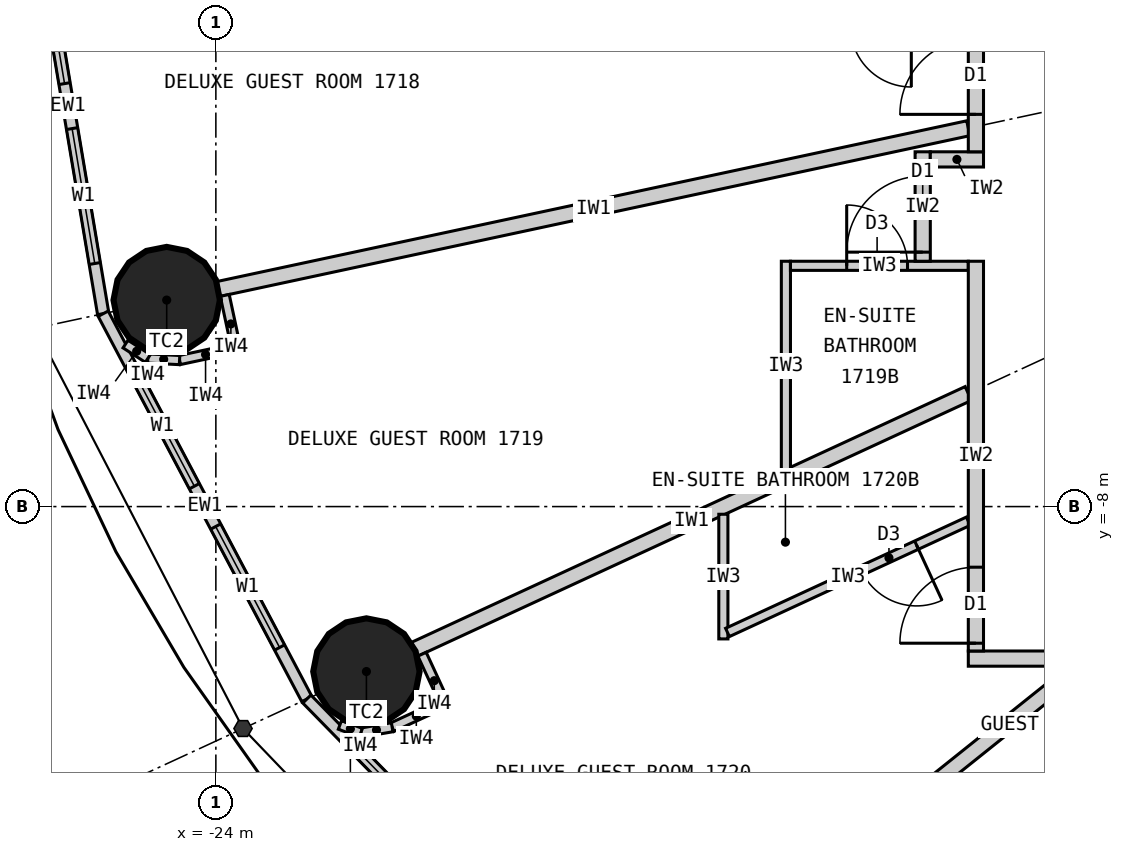
"""IFC4 building model, lengths in metres.
Left out: names, types, materials, properties, quantities, classifications, styles, units other than length and angle.
Written with IfcOpenShell. Run it as: python <this file> out.ifc"""

import sys

from ifc_helpers import new_model, si_unit, direction, frame, frame_2d, origin, origin_2d, place, context, subcontext, project, spatial, rectangle, circle, extrude, element, fill, save


model = new_model("IFC4")
c1 = context("Model", 3, precision=1e-05, world=origin(), true_north=direction((0.0, 1.0)))
c2 = subcontext(c1, "Body", "Model", "MODEL_VIEW")
j1 = project(units=[si_unit("LENGTHUNIT", "METRE"), si_unit("PLANEANGLEUNIT", "RADIAN")], contexts=[c1])
p1 = place(None, origin())
s1 = spatial("IfcSite", under=j1, at=p1, CompositionType="ELEMENT")
p2 = place(p1, origin())
s2 = spatial("IfcBuilding", under=s1, at=p2, CompositionType="ELEMENT")
p3 = place(p2, frame((0.0, 0.0, 70.5)))
s3 = spatial("IfcBuildingStorey", under=s2, at=p3, CompositionType="ELEMENT", Elevation=70.5)
for number, where, z_axis, x_axis in (
    (1, (-24.647, -5.283, 0.0), (0.0, 0.0, 1.0), (1.0, 0.0, 0.0)),
    (2, (-22.019, -10.17, 0.0), (0.0, 0.0, 1.0), (1.0, 0.0, 0.0)),
):
    element("IfcColumn", number, at=place(p3, frame(where, z_axis=z_axis, x_axis=x_axis)), inside=s3, PredefinedType="COLUMN", context=c2, shape_type="SweptSolid", body=[
        extrude(circle(Radius=0.7, at=origin_2d()), origin(), (0.0, 0.0, 1.0), 3.3),
    ])
p4 = place(p3, frame((-26.4, 0.0, 0.0), z_axis=(0.0, 0.0, 1.0), x_axis=(0.165642551694, -0.986185857264, 0.0)))
e3 = element("IfcWall", 3, at=p4, inside=s3, PredefinedType="ELEMENTEDWALL", context=c2, shape_type="SweptSolid", body=[
    extrude(rectangle(XDim=5.539, YDim=0.15, at=frame_2d((2.77, 0.0))), origin(), (0.0, 0.0, 1.0), 3.12),
])
p5 = place(p4, frame((0.669, 0.0, 0.9)))
e4 = element("IfcOpeningElement", 4, at=p5, cuts=e3, PredefinedType="OPENING", context=c2, shape_type="SweptSolid", body=[
    extrude(rectangle(XDim=1.8, YDim=1.9, at=frame_2d((0.9, 0.95))), frame((0.0, 0.085, 0.0), z_axis=(0.0, -1.0, 0.0), x_axis=(1.0, 0.0, 0.0)), (0.0, 0.0, 1.0), 0.17),
])
p6 = place(p4, frame((3.07, 0.0, 0.9)))
e5 = element("IfcOpeningElement", 5, at=p6, cuts=e3, PredefinedType="OPENING", context=c2, shape_type="SweptSolid", body=[
    extrude(rectangle(XDim=1.8, YDim=1.9, at=frame_2d((0.9, 0.95))), frame((0.0, 0.085, 0.0), z_axis=(0.0, -1.0, 0.0), x_axis=(1.0, 0.0, 0.0)), (0.0, 0.0, 1.0), 0.17),
])
p7 = place(p3, frame((-25.482, -5.462, 0.0), z_axis=(0.0, 0.0, 1.0), x_axis=(0.467296867008, -0.884100468321, 0.0)))
e6 = element("IfcWall", 6, at=p7, inside=s3, PredefinedType="ELEMENTEDWALL", context=c2, shape_type="SweptSolid", body=[
    extrude(rectangle(XDim=5.734, YDim=0.15, at=frame_2d((2.867, 0.0))), origin(), (0.0, 0.0, 1.0), 3.12),
])
p8 = place(p7, frame((0.767, 0.0, 0.9)))
e7 = element("IfcOpeningElement", 7, at=p8, cuts=e6, PredefinedType="OPENING", context=c2, shape_type="SweptSolid", body=[
    extrude(rectangle(XDim=1.8, YDim=1.9, at=frame_2d((0.9, 0.95))), frame((0.0, 0.085, 0.0), z_axis=(0.0, -1.0, 0.0), x_axis=(1.0, 0.0, 0.0)), (0.0, 0.0, 1.0), 0.17),
])
p9 = place(p7, frame((3.167, 0.0, 0.9)))
e8 = element("IfcOpeningElement", 8, at=p9, cuts=e6, PredefinedType="OPENING", context=c2, shape_type="SweptSolid", body=[
    extrude(rectangle(XDim=1.8, YDim=1.9, at=frame_2d((0.9, 0.95))), frame((0.0, 0.085, 0.0), z_axis=(0.0, -1.0, 0.0), x_axis=(1.0, 0.0, 0.0)), (0.0, 0.0, 1.0), 0.17),
])
p10 = place(p3, frame((-22.803, -10.532, 0.0), z_axis=(0.0, 0.0, 1.0), x_axis=(0.699602905915, -0.714531856557, 0.0)))
e9 = element("IfcWall", 9, at=p10, inside=s3, PredefinedType="ELEMENTEDWALL", context=c2, shape_type="SweptSolid", body=[
    extrude(rectangle(XDim=6.051, YDim=0.15, at=frame_2d((3.025, 0.0))), origin(), (0.0, 0.0, 1.0), 3.12),
])
p11 = place(p10, frame((0.926, 0.0, 0.9)))
e10 = element("IfcOpeningElement", 10, at=p11, cuts=e9, PredefinedType="OPENING", context=c2, shape_type="SweptSolid", body=[
    extrude(rectangle(XDim=1.8, YDim=1.9, at=frame_2d((0.9, 0.95))), frame((0.0, 0.085, 0.0), z_axis=(0.0, -1.0, 0.0), x_axis=(1.0, 0.0, 0.0)), (0.0, 0.0, 1.0), 0.17),
])
p12 = place(p10, frame((3.325, 0.0, 0.9)))
e11 = element("IfcOpeningElement", 11, at=p12, cuts=e9, PredefinedType="OPENING", context=c2, shape_type="SweptSolid", body=[
    extrude(rectangle(XDim=1.8, YDim=1.9, at=frame_2d((0.9, 0.95))), frame((0.0, 0.085, 0.0), z_axis=(0.0, -1.0, 0.0), x_axis=(1.0, 0.0, 0.0)), (0.0, 0.0, 1.0), 0.17),
])
p13 = place(p3, frame((14.1, -10.0, 0.0), z_axis=(0.0, 0.0, 1.0), x_axis=(-1.0, 0.0, 0.0)))
e12 = element("IfcWall", 12, at=p13, inside=s3, PredefinedType="PARTITIONING", context=c2, shape_type="SweptSolid", body=[
    extrude(rectangle(XDim=28.2, YDim=0.2, at=frame_2d((14.1, 0.0))), origin(), (0.0, 0.0, 1.0), 3.12),
])
p14 = place(p13, frame((24.165, 0.0, 0.0)))
e13 = element("IfcOpeningElement", 13, at=p14, cuts=e12, PredefinedType="OPENING", context=c2, shape_type="SweptSolid", body=[
    extrude(rectangle(XDim=1.0, YDim=2.2, at=frame_2d((0.5, 1.1))), frame((0.0, 0.11, 0.0), z_axis=(0.0, -1.0, 0.0), x_axis=(1.0, 0.0, 0.0)), (0.0, 0.0, 1.0), 0.22),
])
p15 = place(p13, frame((14.923, 0.0, 0.0)))
e14 = element("IfcOpeningElement", 14, at=p15, cuts=e12, PredefinedType="OPENING", context=c2, shape_type="SweptSolid", body=[
    extrude(rectangle(XDim=1.0, YDim=2.2, at=frame_2d((0.5, 1.1))), frame((0.0, 0.11, 0.0), z_axis=(0.0, -1.0, 0.0), x_axis=(1.0, 0.0, 0.0)), (0.0, 0.0, 1.0), 0.22),
])
p16 = place(p13, frame((3.035, 0.0, 0.0)))
e15 = element("IfcOpeningElement", 15, at=p16, cuts=e12, PredefinedType="OPENING", context=c2, shape_type="SweptSolid", body=[
    extrude(rectangle(XDim=1.0, YDim=2.2, at=frame_2d((0.5, 1.1))), frame((0.0, 0.11, 0.0), z_axis=(0.0, -1.0, 0.0), x_axis=(1.0, 0.0, 0.0)), (0.0, 0.0, 1.0), 0.22),
])
p17 = place(p3, frame((-14.1, -3.022, 0.0), z_axis=(0.0, 0.0, 1.0), x_axis=(-0.977790014929, -0.209586943072, 0.0)))
e16 = element("IfcWall", 16, at=p17, inside=s3, PredefinedType="PARTITIONING", context=c2, shape_type="SweptSolid", body=[
    extrude(rectangle(XDim=10.087, YDim=0.2, at=frame_2d((5.043, 0.0))), origin(), (0.0, 0.0, 1.0), 2.32),
])
p18 = place(p3, frame((-14.1, -6.512, 0.0), z_axis=(0.0, 0.0, 1.0), x_axis=(-0.907832871056, -0.419332181247, 0.0)))
e17 = element("IfcWall", 17, at=p18, inside=s3, PredefinedType="PARTITIONING", context=c2, shape_type="SweptSolid", body=[
    extrude(rectangle(XDim=8.023, YDim=0.2, at=frame_2d((4.011, 0.0))), origin(), (0.0, 0.0, 1.0), 2.32),
])
p19 = place(p3, frame((-12.625, -10.1, 0.0), z_axis=(0.0, 0.0, 1.0), x_axis=(-0.780892451574, -0.624665493744, 0.0)))
e18 = element("IfcWall", 18, at=p19, inside=s3, PredefinedType="PARTITIONING", context=c2, shape_type="SweptSolid", body=[
    extrude(rectangle(XDim=6.045, YDim=0.2, at=frame_2d((3.022, 0.0))), origin(), (0.0, 0.0, 1.0), 2.32),
])
p20 = place(p3, frame((-16.5, -7.521, 0.0), z_axis=(0.0, 0.0, 1.0), x_axis=(0.0, 1.0, 0.0)))
e19 = element("IfcWall", 19, at=p20, inside=s3, PredefinedType="PARTITIONING", context=c2, shape_type="SweptSolid", body=[
    extrude(rectangle(XDim=2.749, YDim=0.12, at=frame_2d((1.374, 0.0))), origin(), (0.0, 0.0, 1.0), 3.12),
])
p21 = place(p3, frame((-14.1, -4.833, 0.0), z_axis=(0.0, 0.0, 1.0), x_axis=(-1.0, 0.0, 0.0)))
e20 = element("IfcWall", 20, at=p21, inside=s3, PredefinedType="PARTITIONING", context=c2, shape_type="SweptSolid", body=[
    extrude(rectangle(XDim=2.34, YDim=0.12, at=frame_2d((1.17, 0.0))), origin(), (0.0, 0.0, 1.0), 3.12),
])
p22 = place(p21, frame((0.8, 0.0, 0.0)))
e21 = element("IfcOpeningElement", 21, at=p22, cuts=e20, PredefinedType="OPENING", context=c2, shape_type="SweptSolid", body=[
    extrude(rectangle(XDim=0.8, YDim=2.1, at=frame_2d((0.4, 1.05))), frame((0.0, 0.07, 0.0), z_axis=(0.0, -1.0, 0.0), x_axis=(1.0, 0.0, 0.0)), (0.0, 0.0, 1.0), 0.14),
])
p23 = place(p3, frame((-17.323, -8.101, 0.0), z_axis=(0.0, 0.0, 1.0), x_axis=(0.0, -1.0, 0.0)))
e22 = element("IfcWall", 22, at=p23, inside=s3, PredefinedType="PARTITIONING", context=c2, shape_type="SweptSolid", body=[
    extrude(rectangle(XDim=1.64, YDim=0.12, at=frame_2d((0.82, 0.0))), origin(), (0.0, 0.0, 1.0), 3.12),
])
p24 = place(p3, frame((-14.1, -8.193, 0.0), z_axis=(0.0, 0.0, 1.0), x_axis=(-0.907836493557, -0.419324338628, 0.0)))
e23 = element("IfcWall", 23, at=p24, inside=s3, PredefinedType="PARTITIONING", context=c2, shape_type="SweptSolid", body=[
    extrude(rectangle(XDim=3.49, YDim=0.12, at=frame_2d((1.745, 0.0))), origin(), (0.0, 0.0, 1.0), 3.12),
])
p25 = place(p24, frame((0.75, 0.0, 0.0)))
e24 = element("IfcOpeningElement", 24, at=p25, cuts=e23, PredefinedType="OPENING", context=c2, shape_type="SweptSolid", body=[
    extrude(rectangle(XDim=0.8, YDim=2.1, at=frame_2d((0.4, 1.05))), frame((0.0, 0.07, 0.0), z_axis=(0.0, -1.0, 0.0), x_axis=(1.0, 0.0, 0.0)), (0.0, 0.0, 1.0), 0.14),
])
p26 = place(p3, frame((-14.7, -3.333, 0.0), z_axis=(0.0, 0.0, 1.0), x_axis=(0.0, -1.0, 0.0)))
e25 = element("IfcWall", 25, at=p26, inside=s3, PredefinedType="PARTITIONING", context=c2, shape_type="SweptSolid", body=[
    extrude(rectangle(XDim=1.44, YDim=0.2, at=frame_2d((0.72, 0.0))), origin(), (0.0, 0.0, 1.0), 3.12),
])
p27 = place(p26, frame((0.32, 0.0, 0.0)))
e26 = element("IfcOpeningElement", 26, at=p27, cuts=e25, PredefinedType="OPENING", context=c2, shape_type="SweptSolid", body=[
    extrude(rectangle(XDim=1.0, YDim=2.2, at=frame_2d((0.5, 1.1))), frame((0.0, 0.11, 0.0), z_axis=(0.0, -1.0, 0.0), x_axis=(1.0, 0.0, 0.0)), (0.0, 0.0, 1.0), 0.22),
])
p28 = place(p3, frame((-13.9, -3.433, 0.0), z_axis=(0.0, 0.0, 1.0), x_axis=(-1.0, 0.0, 0.0)))
e27 = element("IfcWall", 27, at=p28, inside=s3, PredefinedType="PARTITIONING", context=c2, shape_type="SweptSolid", body=[
    extrude(rectangle(XDim=0.7, YDim=0.2, at=frame_2d((0.35, 0.0))), origin(), (0.0, 0.0, 1.0), 2.32),
])
p29 = place(p3, frame((-14.0, 3.333, 0.0), z_axis=(0.0, 0.0, 1.0), x_axis=(0.0, -1.0, 0.0)))
e28 = element("IfcWall", 28, at=p29, inside=s3, PredefinedType="PARTITIONING", context=c2, shape_type="SweptSolid", body=[
    extrude(rectangle(XDim=6.665, YDim=0.2, at=frame_2d((3.333, 0.0))), origin(), (0.0, 0.0, 1.0), 3.12),
])
p30 = place(p29, frame((2.15, 0.0, 0.0)))
e29 = element("IfcOpeningElement", 29, at=p30, cuts=e28, PredefinedType="OPENING", context=c2, shape_type="SweptSolid", body=[
    extrude(rectangle(XDim=1.0, YDim=2.2, at=frame_2d((0.5, 1.1))), frame((0.0, 0.11, 0.0), z_axis=(0.0, -1.0, 0.0), x_axis=(1.0, 0.0, 0.0)), (0.0, 0.0, 1.0), 0.22),
])
p31 = place(p29, frame((5.173, 0.0, 0.0)))
e30 = element("IfcOpeningElement", 30, at=p31, cuts=e28, PredefinedType="OPENING", context=c2, shape_type="SweptSolid", body=[
    extrude(rectangle(XDim=1.0, YDim=2.2, at=frame_2d((0.5, 1.1))), frame((0.0, 0.11, 0.0), z_axis=(0.0, -1.0, 0.0), x_axis=(1.0, 0.0, 0.0)), (0.0, 0.0, 1.0), 0.22),
])
p32 = place(p3, frame((-14.0, -4.772, 0.0), z_axis=(0.0, 0.0, 1.0), x_axis=(0.0, -1.0, 0.0)))
e31 = element("IfcWall", 31, at=p32, inside=s3, PredefinedType="PARTITIONING", context=c2, shape_type="SweptSolid", body=[
    extrude(rectangle(XDim=5.127, YDim=0.2, at=frame_2d((2.564, 0.0))), origin(), (0.0, 0.0, 1.0), 3.12),
])
p33 = place(p32, frame((4.025, 0.0, 0.0)))
e32 = element("IfcOpeningElement", 32, at=p33, cuts=e31, PredefinedType="OPENING", context=c2, shape_type="SweptSolid", body=[
    extrude(rectangle(XDim=1.0, YDim=2.2, at=frame_2d((0.5, 1.1))), frame((0.0, 0.11, 0.0), z_axis=(0.0, -1.0, 0.0), x_axis=(1.0, 0.0, 0.0)), (0.0, 0.0, 1.0), 0.22),
])
p34 = place(p3, frame((-23.883, -5.222, 0.0), z_axis=(0.0, 0.0, 1.0), x_axis=(0.209311842415, -0.977848941619, 0.0)))
e33 = element("IfcWall", 33, at=p34, inside=s3, PredefinedType="PARTITIONING", context=c2, shape_type="SweptSolid", body=[
    extrude(rectangle(XDim=0.768, YDim=0.12, at=frame_2d((0.384, 0.0))), origin(), (0.0, 0.0, 1.0), 3.12),
])
p35 = place(p3, frame((-23.793, -5.926, 0.0), z_axis=(0.0, 0.0, 1.0), x_axis=(-0.977792206673, -0.209576717621, 0.0)))
e34 = element("IfcWall", 34, at=p35, inside=s3, PredefinedType="PARTITIONING", context=c2, shape_type="SweptSolid", body=[
    extrude(rectangle(XDim=0.7, YDim=0.12, at=frame_2d((0.35, 0.0))), origin(), (0.0, 0.0, 1.0), 3.12),
])
p36 = place(p3, frame((-24.478, -6.073, 0.0), z_axis=(0.0, 0.0, 1.0), x_axis=(-0.998708262812, 0.05081147302, 0.0)))
e35 = element("IfcWall", 35, at=p36, inside=s3, PredefinedType="PARTITIONING", context=c2, shape_type="SweptSolid", body=[
    extrude(rectangle(XDim=0.418, YDim=0.12, at=frame_2d((0.209, 0.0))), origin(), (0.0, 0.0, 1.0), 3.12),
])
p37 = place(p3, frame((-24.895, -6.052, 0.0), z_axis=(0.0, 0.0, 1.0), x_axis=(-0.839495197275, 0.54336710772, 0.0)))
e36 = element("IfcWall", 36, at=p37, inside=s3, PredefinedType="PARTITIONING", context=c2, shape_type="SweptSolid", body=[
    extrude(rectangle(XDim=0.35, YDim=0.12, at=frame_2d((0.175, 0.0))), origin(), (0.0, 0.0, 1.0), 3.12),
])
p38 = place(p3, frame((-21.287, -9.942, 0.0), z_axis=(0.0, 0.0, 1.0), x_axis=(0.419259891039, -0.907866258744, 0.0)))
e37 = element("IfcWall", 37, at=p38, inside=s3, PredefinedType="PARTITIONING", context=c2, shape_type="SweptSolid", body=[
    extrude(rectangle(XDim=0.768, YDim=0.12, at=frame_2d((0.384, 0.0))), origin(), (0.0, 0.0, 1.0), 3.12),
])
p39 = place(p3, frame((-21.045, -10.61, 0.0), z_axis=(0.0, 0.0, 1.0), x_axis=(-0.907877701396, -0.419235112208, 0.0)))
e38 = element("IfcWall", 38, at=p39, inside=s3, PredefinedType="PARTITIONING", context=c2, shape_type="SweptSolid", body=[
    extrude(rectangle(XDim=0.7, YDim=0.12, at=frame_2d((0.35, 0.0))), origin(), (0.0, 0.0, 1.0), 3.12),
])
p40 = place(p3, frame((-21.68, -10.903, 0.0), z_axis=(0.0, 0.0, 1.0), x_axis=(-0.985446622073, -0.169985161247, 0.0)))
e39 = element("IfcWall", 39, at=p40, inside=s3, PredefinedType="PARTITIONING", context=c2, shape_type="SweptSolid", body=[
    extrude(rectangle(XDim=0.418, YDim=0.12, at=frame_2d((0.209, 0.0))), origin(), (0.0, 0.0, 1.0), 3.12),
])
p41 = place(p3, frame((-22.092, -10.974, 0.0), z_axis=(0.0, 0.0, 1.0), x_axis=(-0.938428160676, 0.345474437912, 0.0)))
e40 = element("IfcWall", 40, at=p41, inside=s3, PredefinedType="PARTITIONING", context=c2, shape_type="SweptSolid", body=[
    extrude(rectangle(XDim=0.294, YDim=0.12, at=frame_2d((0.147, 0.0))), origin(), (0.0, 0.0, 1.0), 3.12),
])
p42 = place(p5, origin())
e41 = element("IfcWindow", 41, at=p42, inside=s3, PartitioningType="SINGLE_PANEL", PredefinedType="WINDOW", context=c2, shape_type="SweptSolid", body=[
    extrude(rectangle(XDim=1.8, YDim=1.9, at=frame_2d((0.9, 0.95))), frame((0.0, 0.03, 0.0), z_axis=(0.0, -1.0, 0.0), x_axis=(1.0, 0.0, 0.0)), (0.0, 0.0, 1.0), 0.06),
])
fill(e4, e41)
p43 = place(p6, origin())
e42 = element("IfcWindow", 42, at=p43, inside=s3, PartitioningType="SINGLE_PANEL", PredefinedType="WINDOW", context=c2, shape_type="SweptSolid", body=[
    extrude(rectangle(XDim=1.8, YDim=1.9, at=frame_2d((0.9, 0.95))), frame((0.0, 0.03, 0.0), z_axis=(0.0, -1.0, 0.0), x_axis=(1.0, 0.0, 0.0)), (0.0, 0.0, 1.0), 0.06),
])
fill(e5, e42)
p44 = place(p8, origin())
e43 = element("IfcWindow", 43, at=p44, inside=s3, PartitioningType="SINGLE_PANEL", PredefinedType="WINDOW", context=c2, shape_type="SweptSolid", body=[
    extrude(rectangle(XDim=1.8, YDim=1.9, at=frame_2d((0.9, 0.95))), frame((0.0, 0.03, 0.0), z_axis=(0.0, -1.0, 0.0), x_axis=(1.0, 0.0, 0.0)), (0.0, 0.0, 1.0), 0.06),
])
fill(e7, e43)
p45 = place(p9, origin())
e44 = element("IfcWindow", 44, at=p45, inside=s3, PartitioningType="SINGLE_PANEL", PredefinedType="WINDOW", context=c2, shape_type="SweptSolid", body=[
    extrude(rectangle(XDim=1.8, YDim=1.9, at=frame_2d((0.9, 0.95))), frame((0.0, 0.03, 0.0), z_axis=(0.0, -1.0, 0.0), x_axis=(1.0, 0.0, 0.0)), (0.0, 0.0, 1.0), 0.06),
])
fill(e8, e44)
p46 = place(p11, origin())
e45 = element("IfcWindow", 45, at=p46, inside=s3, PartitioningType="SINGLE_PANEL", PredefinedType="WINDOW", context=c2, shape_type="SweptSolid", body=[
    extrude(rectangle(XDim=1.8, YDim=1.9, at=frame_2d((0.9, 0.95))), frame((0.0, 0.03, 0.0), z_axis=(0.0, -1.0, 0.0), x_axis=(1.0, 0.0, 0.0)), (0.0, 0.0, 1.0), 0.06),
])
fill(e10, e45)
p47 = place(p31, origin())
e46 = element("IfcDoor", 46, at=p47, inside=s3, OperationType="SINGLE_SWING_RIGHT", PredefinedType="DOOR", context=c2, shape_type="SweptSolid", body=[
    extrude(rectangle(XDim=1.0, YDim=2.2, at=frame_2d((0.5, 1.1))), frame((0.0, 0.025, 0.0), z_axis=(0.0, -1.0, 0.0), x_axis=(1.0, 0.0, 0.0)), (0.0, 0.0, 1.0), 0.05),
])
fill(e30, e46)
p48 = place(p22, origin())
e47 = element("IfcDoor", 47, at=p48, inside=s3, OperationType="SINGLE_SWING_RIGHT", PredefinedType="DOOR", context=c2, shape_type="SweptSolid", body=[
    extrude(rectangle(XDim=0.8, YDim=2.1, at=frame_2d((0.4, 1.05))), frame((0.0, 0.025, 0.0), z_axis=(0.0, -1.0, 0.0), x_axis=(1.0, 0.0, 0.0)), (0.0, 0.0, 1.0), 0.05),
])
fill(e21, e47)
p49 = place(p27, origin())
e48 = element("IfcDoor", 48, at=p49, inside=s3, OperationType="SINGLE_SWING_RIGHT", PredefinedType="DOOR", context=c2, shape_type="SweptSolid", body=[
    extrude(rectangle(XDim=1.0, YDim=2.2, at=frame_2d((0.5, 1.1))), frame((0.0, 0.025, 0.0), z_axis=(0.0, -1.0, 0.0), x_axis=(1.0, 0.0, 0.0)), (0.0, 0.0, 1.0), 0.05),
])
fill(e26, e48)
p50 = place(p25, origin())
e49 = element("IfcDoor", 49, at=p50, inside=s3, OperationType="SINGLE_SWING_LEFT", PredefinedType="DOOR", context=c2, shape_type="SweptSolid", body=[
    extrude(rectangle(XDim=0.8, YDim=2.1, at=frame_2d((0.4, 1.05))), frame((0.0, 0.025, 0.0), z_axis=(0.0, -1.0, 0.0), x_axis=(1.0, 0.0, 0.0)), (0.0, 0.0, 1.0), 0.05),
])
fill(e24, e49)
p51 = place(p33, origin())
e50 = element("IfcDoor", 50, at=p51, inside=s3, OperationType="SINGLE_SWING_RIGHT", PredefinedType="DOOR", context=c2, shape_type="SweptSolid", body=[
    extrude(rectangle(XDim=1.0, YDim=2.2, at=frame_2d((0.5, 1.1))), frame((0.0, 0.025, 0.0), z_axis=(0.0, -1.0, 0.0), x_axis=(1.0, 0.0, 0.0)), (0.0, 0.0, 1.0), 0.05),
])
fill(e32, e50)
save(model, sys.argv[1])
